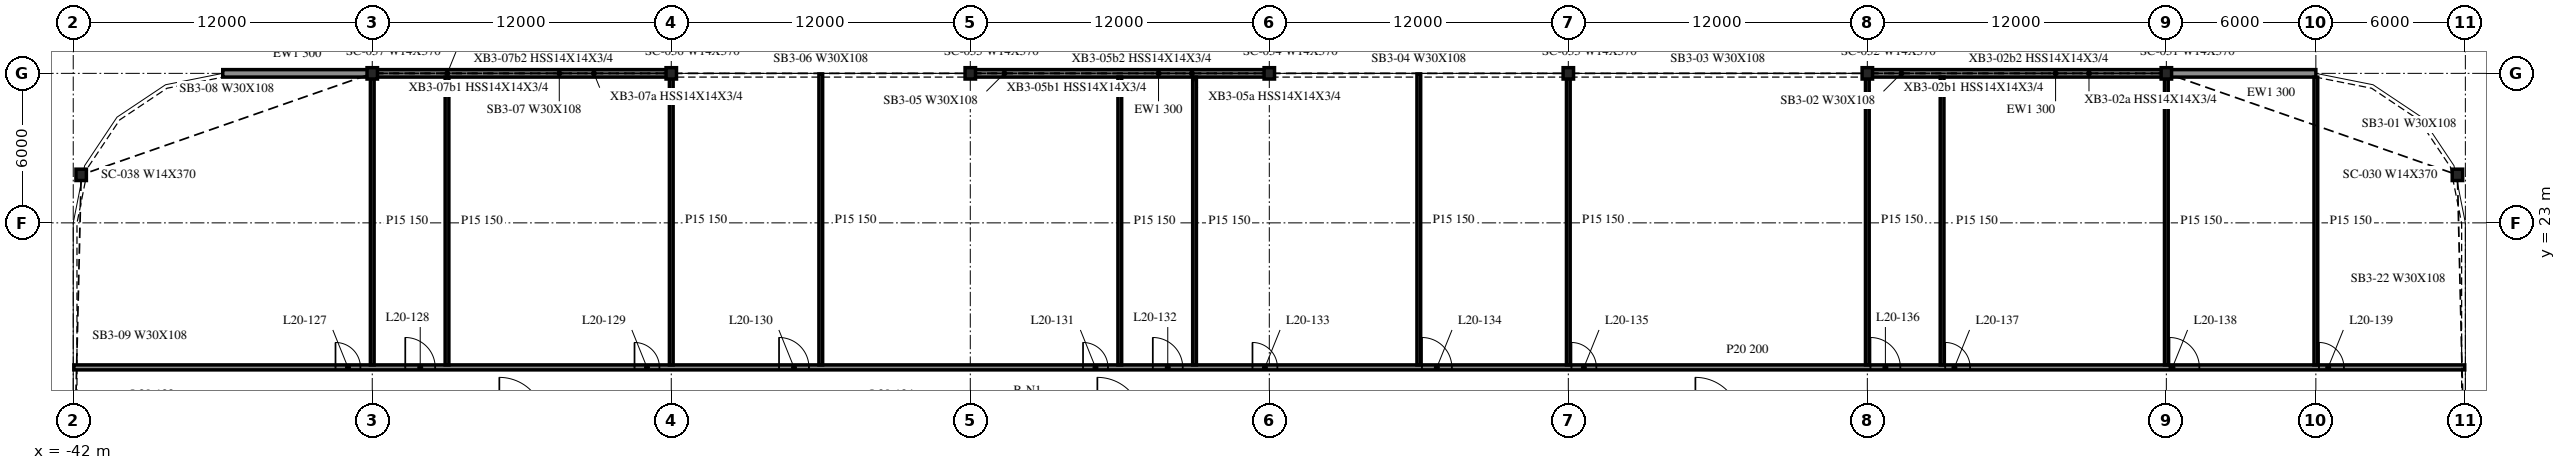
"""IFC4 building model, lengths in metres.
Left out: names, types, materials, properties, quantities, classifications, styles, units other than length and angle.
Written with IfcOpenShell. Run it as: python <this file> out.ifc"""

import sys

from ifc_helpers import new_model, si_unit, direction, frame, frame_2d, origin, origin_2d, place, context, subcontext, project, spatial, rectangle, i_section, extrude, element, fill, save


model = new_model("IFC4")
c1 = context("Model", 3, precision=1e-05, world=origin(), true_north=direction((0.0, 1.0)))
c2 = subcontext(c1, "Body", "Model", "MODEL_VIEW")
j1 = project(units=[si_unit("LENGTHUNIT", "METRE"), si_unit("PLANEANGLEUNIT", "RADIAN")], contexts=[c1])
p1 = place(None, origin())
s1 = spatial("IfcSite", under=j1, at=p1, CompositionType="ELEMENT")
p2 = place(p1, origin())
s2 = spatial("IfcBuilding", under=s1, at=p2, CompositionType="ELEMENT")
p3 = place(p2, frame((0.0, 0.0, 88.9)))
s3 = spatial("IfcBuildingStorey", under=s2, at=p3, CompositionType="ELEMENT", Elevation=88.9)
for number, where, z_axis, x_axis in (
    (1, (53.682, 24.927, -0.34), (0.0, 0.0, 1.0), (1.0, 0.0, 0.0)),
    (2, (42.0, 29.0, -0.34), (0.0, 0.0, 1.0), (1.0, 0.0, 0.0)),
    (3, (30.0, 29.0, -0.34), (0.0, 0.0, 1.0), (1.0, 0.0, 0.0)),
    (4, (18.0, 29.0, -0.34), (0.0, 0.0, 1.0), (1.0, 0.0, 0.0)),
    (5, (6.0, 29.0, -0.34), (0.0, 0.0, 1.0), (1.0, 0.0, 0.0)),
    (6, (-6.0, 29.0, -0.34), (0.0, 0.0, 1.0), (1.0, 0.0, 0.0)),
    (7, (-18.0, 29.0, -0.34), (0.0, 0.0, 1.0), (1.0, 0.0, 0.0)),
    (8, (-30.0, 29.0, -0.34), (0.0, 0.0, 1.0), (1.0, 0.0, 0.0)),
    (9, (-41.682, 24.927, -0.34), (0.0, 0.0, 1.0), (1.0, 0.0, 0.0)),
):
    element("IfcColumn", number, at=place(p3, frame(where, z_axis=z_axis, x_axis=x_axis)), inside=s3, PredefinedType="COLUMN", context=c2, shape_type="SweptSolid", body=[
        extrude(i_section(OverallWidth=0.419, OverallDepth=0.455, WebThickness=0.042, FlangeThickness=0.068, at=origin_2d()), origin(), (0.0, 0.0, 1.0), 4.1),
    ])
p4 = place(p3, frame((48.0, 29.0, 0.0), z_axis=(0.0, 0.0, 1.0), x_axis=(-1.0, 0.0, 0.0)))
e10 = element("IfcWall", 10, at=p4, inside=s3, PredefinedType="NOTDEFINED", context=c2, shape_type="SweptSolid", body=[
    extrude(rectangle(XDim=5.979, YDim=0.3, at=frame_2d((2.99, 0.0))), origin(), (0.0, 0.0, 1.0), 3.003),
])
for number, where, z_axis, x_axis in (
    (11, (41.979, 29.0, 0.0), (0.0, 0.0, 1.0), (-1.0, 0.0, 0.0)),
    (12, (5.979, 29.0, 0.0), (0.0, 0.0, 1.0), (-1.0, 0.0, 0.0)),
    (13, (-18.021, 29.0, 0.0), (0.0, 0.0, 1.0), (-1.0, 0.0, 0.0)),
):
    element("IfcWall", number, at=place(p3, frame(where, z_axis=z_axis, x_axis=x_axis)), inside=s3, PredefinedType="NOTDEFINED", context=c2, shape_type="SweptSolid", body=[
        extrude(rectangle(XDim=11.958, YDim=0.3, at=frame_2d((5.979, 0.0))), origin(), (0.0, 0.0, 1.0), 3.003),
    ])
p5 = place(p3, frame((-30.021, 29.0, 0.0), z_axis=(0.0, 0.0, 1.0), x_axis=(-1.0, 0.0, 0.0)))
e14 = element("IfcWall", 14, at=p5, inside=s3, PredefinedType="NOTDEFINED", context=c2, shape_type="SweptSolid", body=[
    extrude(rectangle(XDim=5.979, YDim=0.3, at=frame_2d((2.99, 0.0))), origin(), (0.0, 0.0, 1.0), 3.003),
])
p6 = place(p3, frame((-41.975, 17.2, 0.0), z_axis=(0.0, 0.0, 1.0), x_axis=(1.0, 0.0, 0.0)))
e15 = element("IfcWall", 15, at=p6, inside=s3, PredefinedType="PARTITIONING", context=c2, shape_type="SweptSolid", body=[
    extrude(rectangle(XDim=95.95, YDim=0.2, at=frame_2d((47.975, 0.0))), origin(), (0.0, 0.0, 1.0), 3.76),
])
p7 = place(p6, frame((10.5, 0.0, 0.0)))
e16 = element("IfcOpeningElement", 16, at=p7, cuts=e15, PredefinedType="OPENING", context=c2, shape_type="SweptSolid", body=[
    extrude(rectangle(XDim=1.0, YDim=2.1, at=frame_2d((0.5, 1.05))), frame((0.0, 0.11, 0.0), z_axis=(0.0, -1.0, 0.0), x_axis=(1.0, 0.0, 0.0)), (0.0, 0.0, 1.0), 0.22),
])
p8 = place(p6, frame((13.3, 0.0, 0.0)))
e17 = element("IfcOpeningElement", 17, at=p8, cuts=e15, PredefinedType="OPENING", context=c2, shape_type="SweptSolid", body=[
    extrude(rectangle(XDim=1.2, YDim=2.1, at=frame_2d((0.6, 1.05))), frame((0.0, 0.11, 0.0), z_axis=(0.0, -1.0, 0.0), x_axis=(1.0, 0.0, 0.0)), (0.0, 0.0, 1.0), 0.22),
])
p9 = place(p6, frame((22.5, 0.0, 0.0)))
e18 = element("IfcOpeningElement", 18, at=p9, cuts=e15, PredefinedType="OPENING", context=c2, shape_type="SweptSolid", body=[
    extrude(rectangle(XDim=1.0, YDim=2.1, at=frame_2d((0.5, 1.05))), frame((0.0, 0.11, 0.0), z_axis=(0.0, -1.0, 0.0), x_axis=(1.0, 0.0, 0.0)), (0.0, 0.0, 1.0), 0.22),
])
p10 = place(p6, frame((28.3, 0.0, 0.0)))
e19 = element("IfcOpeningElement", 19, at=p10, cuts=e15, PredefinedType="OPENING", context=c2, shape_type="SweptSolid", body=[
    extrude(rectangle(XDim=1.2, YDim=2.1, at=frame_2d((0.6, 1.05))), frame((0.0, 0.11, 0.0), z_axis=(0.0, -1.0, 0.0), x_axis=(1.0, 0.0, 0.0)), (0.0, 0.0, 1.0), 0.22),
])
p11 = place(p6, frame((40.5, 0.0, 0.0)))
e20 = element("IfcOpeningElement", 20, at=p11, cuts=e15, PredefinedType="OPENING", context=c2, shape_type="SweptSolid", body=[
    extrude(rectangle(XDim=1.0, YDim=2.1, at=frame_2d((0.5, 1.05))), frame((0.0, 0.11, 0.0), z_axis=(0.0, -1.0, 0.0), x_axis=(1.0, 0.0, 0.0)), (0.0, 0.0, 1.0), 0.22),
])
p12 = place(p6, frame((43.3, 0.0, 0.0)))
e21 = element("IfcOpeningElement", 21, at=p12, cuts=e15, PredefinedType="OPENING", context=c2, shape_type="SweptSolid", body=[
    extrude(rectangle(XDim=1.2, YDim=2.1, at=frame_2d((0.6, 1.05))), frame((0.0, 0.11, 0.0), z_axis=(0.0, -1.0, 0.0), x_axis=(1.0, 0.0, 0.0)), (0.0, 0.0, 1.0), 0.22),
])
p13 = place(p6, frame((47.3, 0.0, 0.0)))
e22 = element("IfcOpeningElement", 22, at=p13, cuts=e15, PredefinedType="OPENING", context=c2, shape_type="SweptSolid", body=[
    extrude(rectangle(XDim=1.0, YDim=2.1, at=frame_2d((0.5, 1.05))), frame((0.0, 0.11, 0.0), z_axis=(0.0, -1.0, 0.0), x_axis=(1.0, 0.0, 0.0)), (0.0, 0.0, 1.0), 0.22),
])
p14 = place(p6, frame((54.1, 0.0, 0.0)))
e23 = element("IfcOpeningElement", 23, at=p14, cuts=e15, PredefinedType="OPENING", context=c2, shape_type="SweptSolid", body=[
    extrude(rectangle(XDim=1.2, YDim=2.1, at=frame_2d((0.6, 1.05))), frame((0.0, 0.11, 0.0), z_axis=(0.0, -1.0, 0.0), x_axis=(1.0, 0.0, 0.0)), (0.0, 0.0, 1.0), 0.22),
])
p15 = place(p6, frame((60.1, 0.0, 0.0)))
e24 = element("IfcOpeningElement", 24, at=p15, cuts=e15, PredefinedType="OPENING", context=c2, shape_type="SweptSolid", body=[
    extrude(rectangle(XDim=1.0, YDim=2.1, at=frame_2d((0.5, 1.05))), frame((0.0, 0.11, 0.0), z_axis=(0.0, -1.0, 0.0), x_axis=(1.0, 0.0, 0.0)), (0.0, 0.0, 1.0), 0.22),
])
p16 = place(p6, frame((72.1, 0.0, 0.0)))
e25 = element("IfcOpeningElement", 25, at=p16, cuts=e15, PredefinedType="OPENING", context=c2, shape_type="SweptSolid", body=[
    extrude(rectangle(XDim=1.2, YDim=2.1, at=frame_2d((0.6, 1.05))), frame((0.0, 0.11, 0.0), z_axis=(0.0, -1.0, 0.0), x_axis=(1.0, 0.0, 0.0)), (0.0, 0.0, 1.0), 0.22),
])
p17 = place(p6, frame((75.1, 0.0, 0.0)))
e26 = element("IfcOpeningElement", 26, at=p17, cuts=e15, PredefinedType="OPENING", context=c2, shape_type="SweptSolid", body=[
    extrude(rectangle(XDim=1.0, YDim=2.1, at=frame_2d((0.5, 1.05))), frame((0.0, 0.11, 0.0), z_axis=(0.0, -1.0, 0.0), x_axis=(1.0, 0.0, 0.0)), (0.0, 0.0, 1.0), 0.22),
])
p18 = place(p6, frame((84.1, 0.0, 0.0)))
e27 = element("IfcOpeningElement", 27, at=p18, cuts=e15, PredefinedType="OPENING", context=c2, shape_type="SweptSolid", body=[
    extrude(rectangle(XDim=1.2, YDim=2.1, at=frame_2d((0.6, 1.05))), frame((0.0, 0.11, 0.0), z_axis=(0.0, -1.0, 0.0), x_axis=(1.0, 0.0, 0.0)), (0.0, 0.0, 1.0), 0.22),
])
p19 = place(p6, frame((90.1, 0.0, 0.0)))
e28 = element("IfcOpeningElement", 28, at=p19, cuts=e15, PredefinedType="OPENING", context=c2, shape_type="SweptSolid", body=[
    extrude(rectangle(XDim=1.0, YDim=2.1, at=frame_2d((0.5, 1.05))), frame((0.0, 0.11, 0.0), z_axis=(0.0, -1.0, 0.0), x_axis=(1.0, 0.0, 0.0)), (0.0, 0.0, 1.0), 0.22),
])
for number, where, z_axis, x_axis in (
    (29, (-30.0, 17.3, 0.0), (0.0, 0.0, 1.0), (0.0, 1.0, 0.0)),
    (30, (-27.0, 17.3, 0.0), (0.0, 0.0, 1.0), (0.0, 1.0, 0.0)),
):
    element("IfcWall", number, at=place(p3, frame(where, z_axis=z_axis, x_axis=x_axis)), inside=s3, PredefinedType="PARTITIONING", context=c2, shape_type="SweptSolid", body=[
        extrude(rectangle(XDim=11.55, YDim=0.15, at=frame_2d((5.775, 0.0))), origin(), (0.0, 0.0, 1.0), 3.76),
    ])
for number, where, z_axis, x_axis in (
    (31, (-18.0, 17.3, 0.0), (0.0, 0.0, 1.0), (0.0, 1.0, 0.0)),
    (32, (-12.0, 17.3, 0.0), (0.0, 0.0, 1.0), (0.0, 1.0, 0.0)),
):
    element("IfcWall", number, at=place(p3, frame(where, z_axis=z_axis, x_axis=x_axis)), inside=s3, PredefinedType="PARTITIONING", context=c2, shape_type="SweptSolid", body=[
        extrude(rectangle(XDim=11.675, YDim=0.15, at=frame_2d((5.837, 0.0))), origin(), (0.0, 0.0, 1.0), 3.76),
    ])
for number, where, z_axis, x_axis in (
    (33, (0.0, 17.3, 0.0), (0.0, 0.0, 1.0), (0.0, 1.0, 0.0)),
    (34, (3.0, 17.3, 0.0), (0.0, 0.0, 1.0), (0.0, 1.0, 0.0)),
):
    element("IfcWall", number, at=place(p3, frame(where, z_axis=z_axis, x_axis=x_axis)), inside=s3, PredefinedType="PARTITIONING", context=c2, shape_type="SweptSolid", body=[
        extrude(rectangle(XDim=11.55, YDim=0.15, at=frame_2d((5.775, 0.0))), origin(), (0.0, 0.0, 1.0), 3.76),
    ])
for number, where, z_axis, x_axis in (
    (35, (12.0, 17.3, 0.0), (0.0, 0.0, 1.0), (0.0, 1.0, 0.0)),
    (36, (18.0, 17.3, 0.0), (0.0, 0.0, 1.0), (0.0, 1.0, 0.0)),
    (37, (30.0, 17.3, 0.0), (0.0, 0.0, 1.0), (0.0, 1.0, 0.0)),
):
    element("IfcWall", number, at=place(p3, frame(where, z_axis=z_axis, x_axis=x_axis)), inside=s3, PredefinedType="PARTITIONING", context=c2, shape_type="SweptSolid", body=[
        extrude(rectangle(XDim=11.675, YDim=0.15, at=frame_2d((5.837, 0.0))), origin(), (0.0, 0.0, 1.0), 3.76),
    ])
for number, where, z_axis, x_axis in (
    (38, (33.0, 17.3, 0.0), (0.0, 0.0, 1.0), (0.0, 1.0, 0.0)),
    (39, (42.0, 17.3, 0.0), (0.0, 0.0, 1.0), (0.0, 1.0, 0.0)),
):
    element("IfcWall", number, at=place(p3, frame(where, z_axis=z_axis, x_axis=x_axis)), inside=s3, PredefinedType="PARTITIONING", context=c2, shape_type="SweptSolid", body=[
        extrude(rectangle(XDim=11.55, YDim=0.15, at=frame_2d((5.775, 0.0))), origin(), (0.0, 0.0, 1.0), 3.76),
    ])
p20 = place(p3, frame((48.0, 17.3, 0.0), z_axis=(0.0, 0.0, 1.0), x_axis=(0.0, 1.0, 0.0)))
e40 = element("IfcWall", 40, at=p20, inside=s3, PredefinedType="PARTITIONING", context=c2, shape_type="SweptSolid", body=[
    extrude(rectangle(XDim=11.547, YDim=0.15, at=frame_2d((5.773, 0.0))), origin(), (0.0, 0.0, 1.0), 3.76),
])
p21 = place(p7, origin())
e41 = element("IfcDoor", 41, at=p21, inside=s3, OperationType="SINGLE_SWING_LEFT", PredefinedType="DOOR", context=c2, shape_type="SweptSolid", body=[
    extrude(rectangle(XDim=1.0, YDim=2.1, at=frame_2d((0.5, 1.05))), frame((0.0, 0.025, 0.0), z_axis=(0.0, -1.0, 0.0), x_axis=(1.0, 0.0, 0.0)), (0.0, 0.0, 1.0), 0.05),
])
fill(e16, e41)
p22 = place(p8, origin())
e42 = element("IfcDoor", 42, at=p22, inside=s3, OperationType="SINGLE_SWING_LEFT", PredefinedType="DOOR", context=c2, shape_type="SweptSolid", body=[
    extrude(rectangle(XDim=1.2, YDim=2.1, at=frame_2d((0.6, 1.05))), frame((0.0, 0.025, 0.0), z_axis=(0.0, -1.0, 0.0), x_axis=(1.0, 0.0, 0.0)), (0.0, 0.0, 1.0), 0.05),
])
fill(e17, e42)
p23 = place(p9, origin())
e43 = element("IfcDoor", 43, at=p23, inside=s3, OperationType="SINGLE_SWING_LEFT", PredefinedType="DOOR", context=c2, shape_type="SweptSolid", body=[
    extrude(rectangle(XDim=1.0, YDim=2.1, at=frame_2d((0.5, 1.05))), frame((0.0, 0.025, 0.0), z_axis=(0.0, -1.0, 0.0), x_axis=(1.0, 0.0, 0.0)), (0.0, 0.0, 1.0), 0.05),
])
fill(e18, e43)
p24 = place(p10, origin())
e44 = element("IfcDoor", 44, at=p24, inside=s3, OperationType="SINGLE_SWING_LEFT", PredefinedType="DOOR", context=c2, shape_type="SweptSolid", body=[
    extrude(rectangle(XDim=1.2, YDim=2.1, at=frame_2d((0.6, 1.05))), frame((0.0, 0.025, 0.0), z_axis=(0.0, -1.0, 0.0), x_axis=(1.0, 0.0, 0.0)), (0.0, 0.0, 1.0), 0.05),
])
fill(e19, e44)
p25 = place(p11, origin())
e45 = element("IfcDoor", 45, at=p25, inside=s3, OperationType="SINGLE_SWING_LEFT", PredefinedType="DOOR", context=c2, shape_type="SweptSolid", body=[
    extrude(rectangle(XDim=1.0, YDim=2.1, at=frame_2d((0.5, 1.05))), frame((0.0, 0.025, 0.0), z_axis=(0.0, -1.0, 0.0), x_axis=(1.0, 0.0, 0.0)), (0.0, 0.0, 1.0), 0.05),
])
fill(e20, e45)
p26 = place(p12, origin())
e46 = element("IfcDoor", 46, at=p26, inside=s3, OperationType="SINGLE_SWING_LEFT", PredefinedType="DOOR", context=c2, shape_type="SweptSolid", body=[
    extrude(rectangle(XDim=1.2, YDim=2.1, at=frame_2d((0.6, 1.05))), frame((0.0, 0.025, 0.0), z_axis=(0.0, -1.0, 0.0), x_axis=(1.0, 0.0, 0.0)), (0.0, 0.0, 1.0), 0.05),
])
fill(e21, e46)
p27 = place(p13, origin())
e47 = element("IfcDoor", 47, at=p27, inside=s3, OperationType="SINGLE_SWING_LEFT", PredefinedType="DOOR", context=c2, shape_type="SweptSolid", body=[
    extrude(rectangle(XDim=1.0, YDim=2.1, at=frame_2d((0.5, 1.05))), frame((0.0, 0.025, 0.0), z_axis=(0.0, -1.0, 0.0), x_axis=(1.0, 0.0, 0.0)), (0.0, 0.0, 1.0), 0.05),
])
fill(e22, e47)
p28 = place(p14, origin())
e48 = element("IfcDoor", 48, at=p28, inside=s3, OperationType="SINGLE_SWING_RIGHT", PredefinedType="DOOR", context=c2, shape_type="SweptSolid", body=[
    extrude(rectangle(XDim=1.2, YDim=2.1, at=frame_2d((0.6, 1.05))), frame((0.0, 0.025, 0.0), z_axis=(0.0, -1.0, 0.0), x_axis=(1.0, 0.0, 0.0)), (0.0, 0.0, 1.0), 0.05),
])
fill(e23, e48)
p29 = place(p15, origin())
e49 = element("IfcDoor", 49, at=p29, inside=s3, OperationType="SINGLE_SWING_RIGHT", PredefinedType="DOOR", context=c2, shape_type="SweptSolid", body=[
    extrude(rectangle(XDim=1.0, YDim=2.1, at=frame_2d((0.5, 1.05))), frame((0.0, 0.025, 0.0), z_axis=(0.0, -1.0, 0.0), x_axis=(1.0, 0.0, 0.0)), (0.0, 0.0, 1.0), 0.05),
])
fill(e24, e49)
p30 = place(p16, origin())
e50 = element("IfcDoor", 50, at=p30, inside=s3, OperationType="SINGLE_SWING_RIGHT", PredefinedType="DOOR", context=c2, shape_type="SweptSolid", body=[
    extrude(rectangle(XDim=1.2, YDim=2.1, at=frame_2d((0.6, 1.05))), frame((0.0, 0.025, 0.0), z_axis=(0.0, -1.0, 0.0), x_axis=(1.0, 0.0, 0.0)), (0.0, 0.0, 1.0), 0.05),
])
fill(e25, e50)
p31 = place(p17, origin())
e51 = element("IfcDoor", 51, at=p31, inside=s3, OperationType="SINGLE_SWING_RIGHT", PredefinedType="DOOR", context=c2, shape_type="SweptSolid", body=[
    extrude(rectangle(XDim=1.0, YDim=2.1, at=frame_2d((0.5, 1.05))), frame((0.0, 0.025, 0.0), z_axis=(0.0, -1.0, 0.0), x_axis=(1.0, 0.0, 0.0)), (0.0, 0.0, 1.0), 0.05),
])
fill(e26, e51)
p32 = place(p18, origin())
e52 = element("IfcDoor", 52, at=p32, inside=s3, OperationType="SINGLE_SWING_RIGHT", PredefinedType="DOOR", context=c2, shape_type="SweptSolid", body=[
    extrude(rectangle(XDim=1.2, YDim=2.1, at=frame_2d((0.6, 1.05))), frame((0.0, 0.025, 0.0), z_axis=(0.0, -1.0, 0.0), x_axis=(1.0, 0.0, 0.0)), (0.0, 0.0, 1.0), 0.05),
])
fill(e27, e52)
p33 = place(p19, origin())
e53 = element("IfcDoor", 53, at=p33, inside=s3, OperationType="SINGLE_SWING_RIGHT", PredefinedType="DOOR", context=c2, shape_type="SweptSolid", body=[
    extrude(rectangle(XDim=1.0, YDim=2.1, at=frame_2d((0.5, 1.05))), frame((0.0, 0.025, 0.0), z_axis=(0.0, -1.0, 0.0), x_axis=(1.0, 0.0, 0.0)), (0.0, 0.0, 1.0), 0.05),
])
fill(e28, e53)
save(model, sys.argv[1])
